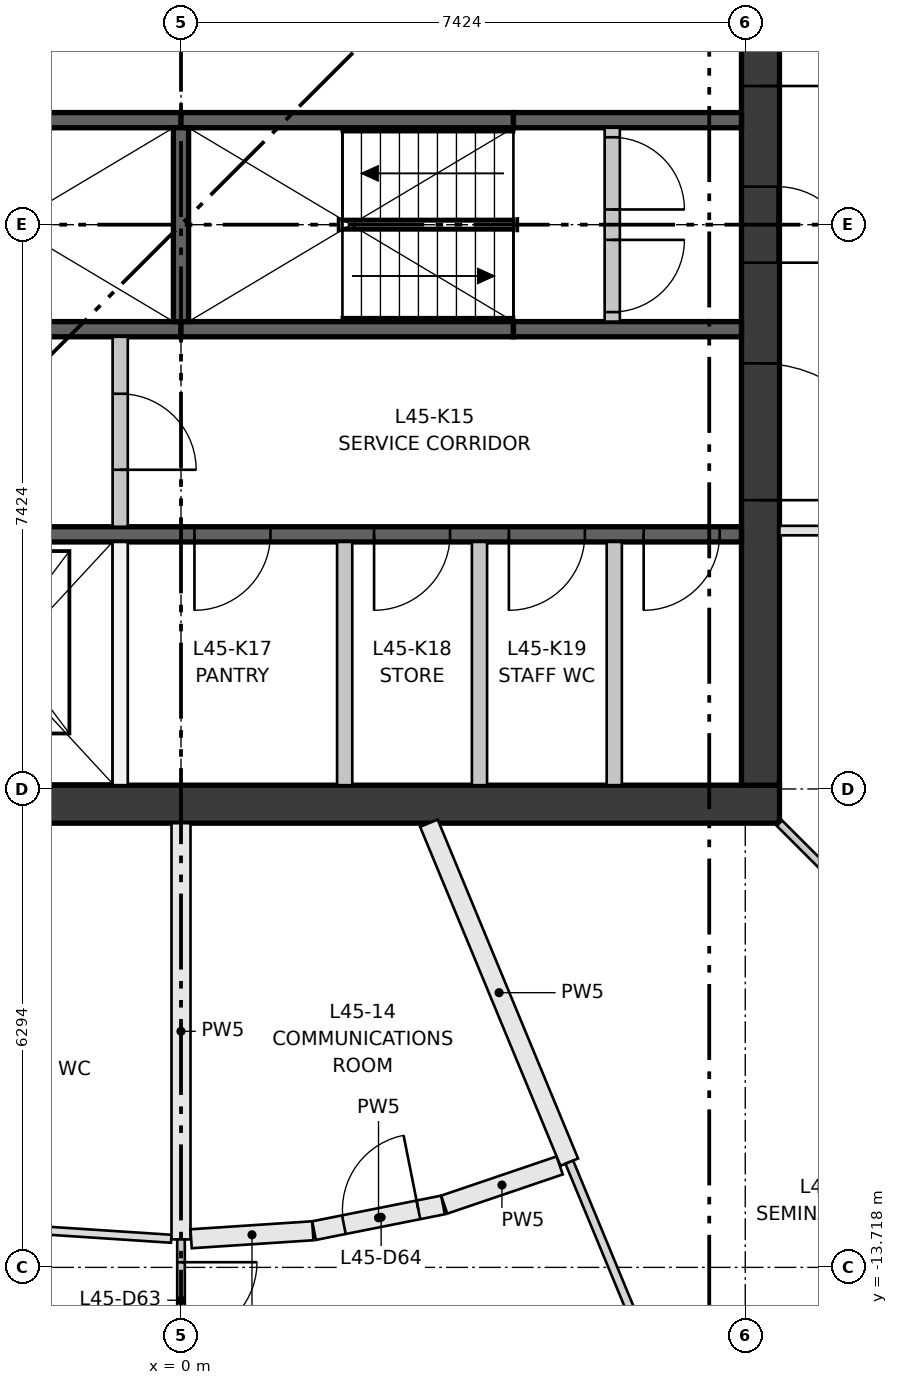
"""IFC4 building model, lengths in metres.
Left out: names, types, materials, properties, quantities, classifications, styles, units other than length and angle.
Written with IfcOpenShell. Run it as: python <this file> out.ifc"""

import sys

from ifc_helpers import new_model, si_unit, direction, frame, frame_2d, origin, place, context, subcontext, project, spatial, rectangle, extrude, element, fill, save


model = new_model("IFC4")
c1 = context("Model", 3, precision=1e-05, world=origin(), true_north=direction((0.0, 1.0)))
c2 = subcontext(c1, "Body", "Model", "MODEL_VIEW")
j1 = project(units=[si_unit("LENGTHUNIT", "METRE"), si_unit("PLANEANGLEUNIT", "RADIAN")], contexts=[c1])
p1 = place(None, origin())
s1 = spatial("IfcSite", under=j1, at=p1, CompositionType="ELEMENT")
p2 = place(p1, origin())
s2 = spatial("IfcBuilding", under=s1, at=p2, CompositionType="ELEMENT")
p3 = place(p2, frame((0.0, 0.0, 170.9)))
s3 = spatial("IfcBuildingStorey", under=s2, at=p3, CompositionType="ELEMENT", Elevation=170.9)
p4 = place(p3, frame((-7.874, -7.624, 0.0), z_axis=(0.0, 0.0, 1.0), x_axis=(1.0, 0.0, 0.0)))
e1 = element("IfcWall", 1, at=p4, inside=s3, PredefinedType="SHEAR", context=c2, shape_type="SweptSolid", body=[
    extrude(rectangle(XDim=15.748, YDim=0.5, at=frame_2d((7.874, 0.0))), origin(), (0.0, 0.0, 1.0), 3.35),
])
p5 = place(p3, frame((7.624, -7.374, 0.0), z_axis=(0.0, 0.0, 1.0), x_axis=(0.0, 1.0, 0.0)))
e2 = element("IfcWall", 2, at=p5, inside=s3, PredefinedType="SHEAR", context=c2, shape_type="SweptSolid", body=[
    extrude(rectangle(XDim=14.748, YDim=0.5, at=frame_2d((7.374, 0.0))), origin(), (0.0, 0.0, 1.0), 3.35),
])
p6 = place(p5, frame((6.874, 0.0, 0.0)))
e3 = element("IfcOpeningElement", 3, at=p6, cuts=e2, PredefinedType="OPENING", context=c2, shape_type="SweptSolid", body=[
    extrude(rectangle(XDim=1.0, YDim=2.1, at=frame_2d((0.5, 1.05))), frame((0.0, 0.26, 0.0), z_axis=(0.0, -1.0, 0.0), x_axis=(1.0, 0.0, 0.0)), (0.0, 0.0, 1.0), 0.52),
])
p7 = place(p5, frame((3.75, 0.0, 0.0)))
e4 = element("IfcOpeningElement", 4, at=p7, cuts=e2, PredefinedType="OPENING", context=c2, shape_type="SweptSolid", body=[
    extrude(rectangle(XDim=1.8, YDim=2.1, at=frame_2d((0.9, 1.05))), frame((0.0, 0.26, 0.0), z_axis=(0.0, -1.0, 0.0), x_axis=(1.0, 0.0, 0.0)), (0.0, 0.0, 1.0), 0.52),
])
p8 = place(p5, frame((9.198, 0.0, 0.0)))
e5 = element("IfcOpeningElement", 5, at=p8, cuts=e2, PredefinedType="OPENING", context=c2, shape_type="SweptSolid", body=[
    extrude(rectangle(XDim=1.8, YDim=2.1, at=frame_2d((0.9, 1.05))), frame((0.0, 0.26, 0.0), z_axis=(0.0, -1.0, 0.0), x_axis=(1.0, 0.0, 0.0)), (0.0, 0.0, 1.0), 0.52),
])
p9 = place(p3, frame((-7.374, -4.074, 0.0), z_axis=(0.0, 0.0, 1.0), x_axis=(1.0, 0.0, 0.0)))
e6 = element("IfcWall", 6, at=p9, inside=s3, PredefinedType="SHEAR", context=c2, shape_type="SweptSolid", body=[
    extrude(rectangle(XDim=14.748, YDim=0.2, at=frame_2d((7.374, 0.0))), origin(), (0.0, 0.0, 1.0), 3.0),
])
p10 = place(p9, frame((1.319, 0.0, 0.0)))
e7 = element("IfcOpeningElement", 7, at=p10, cuts=e6, PredefinedType="OPENING", context=c2, shape_type="SweptSolid", body=[
    extrude(rectangle(XDim=1.1, YDim=2.1, at=frame_2d((0.55, 1.05))), frame((0.0, 0.11, 0.0), z_axis=(0.0, -1.0, 0.0), x_axis=(1.0, 0.0, 0.0)), (0.0, 0.0, 1.0), 0.22),
])
p11 = place(p9, frame((4.456, 0.0, 0.0)))
e8 = element("IfcOpeningElement", 8, at=p11, cuts=e6, PredefinedType="OPENING", context=c2, shape_type="SweptSolid", body=[
    extrude(rectangle(XDim=1.1, YDim=2.1, at=frame_2d((0.55, 1.05))), frame((0.0, 0.11, 0.0), z_axis=(0.0, -1.0, 0.0), x_axis=(1.0, 0.0, 0.0)), (0.0, 0.0, 1.0), 0.22),
])
p12 = place(p9, frame((7.551, 0.0, 0.0)))
e9 = element("IfcOpeningElement", 9, at=p12, cuts=e6, PredefinedType="OPENING", context=c2, shape_type="SweptSolid", body=[
    extrude(rectangle(XDim=1.0, YDim=2.1, at=frame_2d((0.5, 1.05))), frame((0.0, 0.11, 0.0), z_axis=(0.0, -1.0, 0.0), x_axis=(1.0, 0.0, 0.0)), (0.0, 0.0, 1.0), 0.22),
])
p13 = place(p9, frame((9.914, 0.0, 0.0)))
e10 = element("IfcOpeningElement", 10, at=p13, cuts=e6, PredefinedType="OPENING", context=c2, shape_type="SweptSolid", body=[
    extrude(rectangle(XDim=1.0, YDim=2.1, at=frame_2d((0.5, 1.05))), frame((0.0, 0.11, 0.0), z_axis=(0.0, -1.0, 0.0), x_axis=(1.0, 0.0, 0.0)), (0.0, 0.0, 1.0), 0.22),
])
p14 = place(p9, frame((11.688, 0.0, 0.0)))
e11 = element("IfcOpeningElement", 11, at=p14, cuts=e6, PredefinedType="OPENING", context=c2, shape_type="SweptSolid", body=[
    extrude(rectangle(XDim=1.0, YDim=2.1, at=frame_2d((0.5, 1.05))), frame((0.0, 0.11, 0.0), z_axis=(0.0, -1.0, 0.0), x_axis=(1.0, 0.0, 0.0)), (0.0, 0.0, 1.0), 0.22),
])
p15 = place(p9, frame((13.461, 0.0, 0.0)))
e12 = element("IfcOpeningElement", 12, at=p15, cuts=e6, PredefinedType="OPENING", context=c2, shape_type="SweptSolid", body=[
    extrude(rectangle(XDim=1.0, YDim=2.1, at=frame_2d((0.5, 1.05))), frame((0.0, 0.11, 0.0), z_axis=(0.0, -1.0, 0.0), x_axis=(1.0, 0.0, 0.0)), (0.0, 0.0, 1.0), 0.22),
])
for number, where, z_axis, x_axis in (
    (13, (-4.374, -1.375, 0.0), (0.0, 0.0, 1.0), (1.0, 0.0, 0.0)),
    (14, (0.0, -1.375, 0.0), (0.0, 0.0, 1.0), (1.0, 0.0, 0.0)),
):
    element("IfcWall", number, at=place(p3, frame(where, z_axis=z_axis, x_axis=x_axis)), inside=s3, PredefinedType="SHEAR", context=c2, shape_type="SweptSolid", body=[
        extrude(rectangle(XDim=4.374, YDim=0.2, at=frame_2d((2.187, 0.0))), origin(), (0.0, 0.0, 1.0), 3.0),
    ])
p16 = place(p3, frame((4.374, -1.375, 0.0), z_axis=(0.0, 0.0, 1.0), x_axis=(1.0, 0.0, 0.0)))
e15 = element("IfcWall", 15, at=p16, inside=s3, PredefinedType="SHEAR", context=c2, shape_type="SweptSolid", body=[
    extrude(rectangle(XDim=3.0, YDim=0.2, at=frame_2d((1.5, 0.0))), origin(), (0.0, 0.0, 1.0), 3.0),
])
for number, where, z_axis, x_axis in (
    (16, (-4.374, 1.375, 0.0), (0.0, 0.0, 1.0), (1.0, 0.0, 0.0)),
    (17, (0.0, 1.375, 0.0), (0.0, 0.0, 1.0), (1.0, 0.0, 0.0)),
):
    element("IfcWall", number, at=place(p3, frame(where, z_axis=z_axis, x_axis=x_axis)), inside=s3, PredefinedType="SHEAR", context=c2, shape_type="SweptSolid", body=[
        extrude(rectangle(XDim=4.374, YDim=0.2, at=frame_2d((2.187, 0.0))), origin(), (0.0, 0.0, 1.0), 3.0),
    ])
p17 = place(p3, frame((4.374, 1.375, 0.0), z_axis=(0.0, 0.0, 1.0), x_axis=(1.0, 0.0, 0.0)))
e18 = element("IfcWall", 18, at=p17, inside=s3, PredefinedType="SHEAR", context=c2, shape_type="SweptSolid", body=[
    extrude(rectangle(XDim=3.0, YDim=0.2, at=frame_2d((1.5, 0.0))), origin(), (0.0, 0.0, 1.0), 3.0),
])
p18 = place(p3, frame((0.0, -1.275, 0.0), z_axis=(0.0, 0.0, 1.0), x_axis=(0.0, 1.0, 0.0)))
e19 = element("IfcWall", 19, at=p18, inside=s3, PredefinedType="SHEAR", context=c2, shape_type="SweptSolid", body=[
    extrude(rectangle(XDim=2.55, YDim=0.2, at=frame_2d((1.275, 0.0))), origin(), (0.0, 0.0, 1.0), 3.0),
])
p19 = place(p3, frame((-0.8, -7.374, 0.0), z_axis=(0.0, 0.0, 1.0), x_axis=(0.0, 1.0, 0.0)))
e20 = element("IfcWall", 20, at=p19, inside=s3, PredefinedType="PARTITIONING", context=c2, shape_type="SweptSolid", body=[
    extrude(rectangle(XDim=3.2, YDim=0.2, at=frame_2d((1.6, 0.0))), origin(), (0.0, 0.0, 1.0), 3.0),
])
p20 = place(p3, frame((-0.8, -3.974, 0.0), z_axis=(0.0, 0.0, 1.0), x_axis=(0.0, 1.0, 0.0)))
e21 = element("IfcWall", 21, at=p20, inside=s3, PredefinedType="PARTITIONING", context=c2, shape_type="SweptSolid", body=[
    extrude(rectangle(XDim=2.499, YDim=0.2, at=frame_2d((1.25, 0.0))), origin(), (0.0, 0.0, 1.0), 3.0),
])
p21 = place(p20, frame((0.75, 0.0, 0.0)))
e22 = element("IfcOpeningElement", 22, at=p21, cuts=e21, PredefinedType="OPENING", context=c2, shape_type="SweptSolid", body=[
    extrude(rectangle(XDim=1.0, YDim=2.1, at=frame_2d((0.5, 1.05))), frame((0.0, 0.11, 0.0), z_axis=(0.0, -1.0, 0.0), x_axis=(1.0, 0.0, 0.0)), (0.0, 0.0, 1.0), 0.22),
])
for number, where, z_axis, x_axis in (
    (23, (2.154, -7.374, 0.0), (0.0, 0.0, 1.0), (0.0, 1.0, 0.0)),
    (24, (3.927, -7.374, 0.0), (0.0, 0.0, 1.0), (0.0, 1.0, 0.0)),
    (25, (5.7, -7.374, 0.0), (0.0, 0.0, 1.0), (0.0, 1.0, 0.0)),
):
    element("IfcWall", number, at=place(p3, frame(where, z_axis=z_axis, x_axis=x_axis)), inside=s3, PredefinedType="PARTITIONING", context=c2, shape_type="SweptSolid", body=[
        extrude(rectangle(XDim=3.2, YDim=0.2, at=frame_2d((1.6, 0.0))), origin(), (0.0, 0.0, 1.0), 3.0),
    ])
p22 = place(p3, frame((5.674, -1.275, 0.0), z_axis=(0.0, 0.0, 1.0), x_axis=(0.0, 1.0, 0.0)))
e26 = element("IfcWall", 26, at=p22, inside=s3, PredefinedType="PARTITIONING", context=c2, shape_type="SweptSolid", body=[
    extrude(rectangle(XDim=2.55, YDim=0.2, at=frame_2d((1.275, 0.0))), origin(), (0.0, 0.0, 1.0), 3.0),
])
p23 = place(p22, frame((0.125, 0.0, 0.0)))
e27 = element("IfcOpeningElement", 27, at=p23, cuts=e26, PredefinedType="OPENING", context=c2, shape_type="SweptSolid", body=[
    extrude(rectangle(XDim=0.95, YDim=2.1, at=frame_2d((0.475, 1.05))), frame((0.0, 0.11, 0.0), z_axis=(0.0, -1.0, 0.0), x_axis=(1.0, 0.0, 0.0)), (0.0, 0.0, 1.0), 0.22),
])
p24 = place(p22, frame((1.475, 0.0, 0.0)))
e28 = element("IfcOpeningElement", 28, at=p24, cuts=e26, PredefinedType="OPENING", context=c2, shape_type="SweptSolid", body=[
    extrude(rectangle(XDim=0.95, YDim=2.1, at=frame_2d((0.475, 1.05))), frame((0.0, 0.11, 0.0), z_axis=(0.0, -1.0, 0.0), x_axis=(1.0, 0.0, 0.0)), (0.0, 0.0, 1.0), 0.22),
])
p25 = place(p3, frame((12.615, -4.024, 0.0), z_axis=(0.0, 0.0, 1.0), x_axis=(-1.0, 0.0, 0.0)))
e29 = element("IfcWall", 29, at=p25, inside=s3, PredefinedType="PARTITIONING", context=c2, shape_type="SweptSolid", body=[
    extrude(rectangle(XDim=4.741, YDim=0.125, at=frame_2d((2.37, 0.0))), origin(), (0.0, 0.0, 1.0), 3.0),
])
p26 = place(p25, frame((1.9, 0.0, 0.0)))
e30 = element("IfcOpeningElement", 30, at=p26, cuts=e29, PredefinedType="OPENING", context=c2, shape_type="SweptSolid", body=[
    extrude(rectangle(XDim=1.0, YDim=2.1, at=frame_2d((0.5, 1.05))), frame((0.0, 0.073, 0.0), z_axis=(0.0, -1.0, 0.0), x_axis=(1.0, 0.0, 0.0)), (0.0, 0.0, 1.0), 0.145),
])
p27 = place(p3, frame((-0.128, -13.342, 0.0), z_axis=(0.0, 0.0, 1.0), x_axis=(-0.997862773684, 0.065344356258, 0.0)))
e31 = element("IfcWall", 31, at=p27, inside=s3, PredefinedType="PARTITIONING", context=c2, shape_type="SweptSolid", body=[
    extrude(rectangle(XDim=1.614, YDim=0.105, at=frame_2d((0.807, 0.0))), origin(), (0.0, 0.0, 1.0), 3.0),
])
p28 = place(p3, frame((0.0, -7.874, 0.0), z_axis=(0.0, 0.0, 1.0), x_axis=(0.0, -1.0, 0.0)))
e32 = element("IfcWall", 32, at=p28, inside=s3, PredefinedType="PARTITIONING", context=c2, shape_type="SweptSolid", body=[
    extrude(rectangle(XDim=5.476, YDim=0.25, at=frame_2d((2.738, 0.0))), origin(), (0.0, 0.0, 1.0), 3.0),
])
p29 = place(p3, frame((0.0, -13.35, 0.0), z_axis=(0.0, 0.0, 1.0), x_axis=(0.0, -1.0, 0.0)))
e33 = element("IfcWall", 33, at=p29, inside=s3, PredefinedType="PARTITIONING", context=c2, shape_type="SweptSolid", body=[
    extrude(rectangle(XDim=4.27, YDim=0.1, at=frame_2d((2.135, 0.0))), origin(), (0.0, 0.0, 1.0), 3.0),
])
p30 = place(p29, frame((0.3, 0.0, 0.0)))
e34 = element("IfcOpeningElement", 34, at=p30, cuts=e33, PredefinedType="OPENING", context=c2, shape_type="SweptSolid", body=[
    extrude(rectangle(XDim=1.0, YDim=2.1, at=frame_2d((0.5, 1.05))), frame((0.0, 0.06, 0.0), z_axis=(0.0, -1.0, 0.0), x_axis=(1.0, 0.0, 0.0)), (0.0, 0.0, 1.0), 0.12),
])
p31 = place(p3, frame((1.734, -13.236, 0.0), z_axis=(0.0, 0.0, 1.0), x_axis=(-0.997857274773, -0.065428275107, 0.0)))
e35 = element("IfcWall", 35, at=p31, inside=s3, PredefinedType="PARTITIONING", context=c2, shape_type="SweptSolid", body=[
    extrude(rectangle(XDim=1.604, YDim=0.25, at=frame_2d((0.802, 0.0))), origin(), (0.0, 0.0, 1.0), 3.0),
])
p32 = place(p3, frame((1.75, -13.234, 0.0), z_axis=(0.0, 0.0, 1.0), x_axis=(0.98079718542, 0.195030461907, 0.0)))
e36 = element("IfcWall", 36, at=p32, inside=s3, PredefinedType="PARTITIONING", context=c2, shape_type="SweptSolid", body=[
    extrude(rectangle(XDim=1.73, YDim=0.25, at=frame_2d((0.865, 0.0))), origin(), (0.0, 0.0, 1.0), 3.0),
])
p33 = place(p32, frame((0.4, 0.0, 0.0)))
e37 = element("IfcOpeningElement", 37, at=p33, cuts=e36, PredefinedType="OPENING", context=c2, shape_type="SweptSolid", body=[
    extrude(rectangle(XDim=1.0, YDim=2.1, at=frame_2d((0.5, 1.05))), frame((0.0, 0.135, 0.0), z_axis=(0.0, -1.0, 0.0), x_axis=(1.0, 0.0, 0.0)), (0.0, 0.0, 1.0), 0.27),
])
p34 = place(p3, frame((4.982, -12.377, 0.0), z_axis=(0.0, 0.0, 1.0), x_axis=(-0.946919168061, -0.321471754838, 0.0)))
e38 = element("IfcWall", 38, at=p34, inside=s3, PredefinedType="PARTITIONING", context=c2, shape_type="SweptSolid", body=[
    extrude(rectangle(XDim=1.605, YDim=0.25, at=frame_2d((0.802, 0.0))), origin(), (0.0, 0.0, 1.0), 3.0),
])
p35 = place(p3, frame((3.261, -7.874, 0.0), z_axis=(0.0, 0.0, 1.0), x_axis=(0.382707643949, -0.923869503373, 0.0)))
e39 = element("IfcWall", 39, at=p35, inside=s3, PredefinedType="PARTITIONING", context=c2, shape_type="SweptSolid", body=[
    extrude(rectangle(XDim=4.827, YDim=0.25, at=frame_2d((2.414, 0.0))), origin(), (0.0, 0.0, 1.0), 3.0),
])
p36 = place(p3, frame((5.109, -12.334, 0.0), z_axis=(0.0, 0.0, 1.0), x_axis=(0.382669916503, -0.923885130849, 0.0)))
e40 = element("IfcWall", 40, at=p36, inside=s3, PredefinedType="PARTITIONING", context=c2, shape_type="SweptSolid", body=[
    extrude(rectangle(XDim=4.27, YDim=0.11, at=frame_2d((2.135, 0.0))), origin(), (0.0, 0.0, 1.0), 3.0),
])
p37 = place(p3, frame((12.459, -12.459, 0.0), z_axis=(0.0, 0.0, 1.0), x_axis=(-0.707106781187, 0.707106781187, 0.0)))
e41 = element("IfcWall", 41, at=p37, inside=s3, PredefinedType="PARTITIONING", context=c2, shape_type="SweptSolid", body=[
    extrude(rectangle(XDim=6.484, YDim=0.1, at=frame_2d((3.242, 0.0))), origin(), (0.0, 0.0, 1.0), 3.0),
])
p38 = place(p37, frame((3.0, 0.0, 0.0)))
e42 = element("IfcOpeningElement", 42, at=p38, cuts=e41, PredefinedType="OPENING", context=c2, shape_type="SweptSolid", body=[
    extrude(rectangle(XDim=1.0, YDim=2.1, at=frame_2d((0.5, 1.05))), frame((0.0, 0.06, 0.0), z_axis=(0.0, -1.0, 0.0), x_axis=(1.0, 0.0, 0.0)), (0.0, 0.0, 1.0), 0.12),
])
p39 = place(p23, frame((0.95, 0.0, 0.0), z_axis=(0.0, 0.0, 1.0), x_axis=(-1.0, 0.0, 0.0)))
e43 = element("IfcDoor", 43, at=p39, inside=s3, OperationType="SINGLE_SWING_RIGHT", PredefinedType="DOOR", context=c2, shape_type="SweptSolid", body=[
    extrude(rectangle(XDim=0.95, YDim=2.1, at=frame_2d((0.475, 1.05))), frame((0.0, 0.025, 0.0), z_axis=(0.0, -1.0, 0.0), x_axis=(1.0, 0.0, 0.0)), (0.0, 0.0, 1.0), 0.05),
])
fill(e27, e43)
p40 = place(p24, frame((0.95, 0.0, 0.0), z_axis=(0.0, 0.0, 1.0), x_axis=(-1.0, 0.0, 0.0)))
e44 = element("IfcDoor", 44, at=p40, inside=s3, OperationType="SINGLE_SWING_LEFT", PredefinedType="DOOR", context=c2, shape_type="SweptSolid", body=[
    extrude(rectangle(XDim=0.95, YDim=2.1, at=frame_2d((0.475, 1.05))), frame((0.0, 0.025, 0.0), z_axis=(0.0, -1.0, 0.0), x_axis=(1.0, 0.0, 0.0)), (0.0, 0.0, 1.0), 0.05),
])
fill(e28, e44)
p41 = place(p21, frame((1.0, 0.0, 0.0), z_axis=(0.0, 0.0, 1.0), x_axis=(-1.0, 0.0, 0.0)))
e45 = element("IfcDoor", 45, at=p41, inside=s3, OperationType="SINGLE_SWING_LEFT", PredefinedType="DOOR", context=c2, shape_type="SweptSolid", body=[
    extrude(rectangle(XDim=1.0, YDim=2.1, at=frame_2d((0.5, 1.05))), frame((0.0, 0.025, 0.0), z_axis=(0.0, -1.0, 0.0), x_axis=(1.0, 0.0, 0.0)), (0.0, 0.0, 1.0), 0.05),
])
fill(e22, e45)
p42 = place(p12, frame((1.0, 0.0, 0.0), z_axis=(0.0, 0.0, 1.0), x_axis=(-1.0, 0.0, 0.0)))
e46 = element("IfcDoor", 46, at=p42, inside=s3, OperationType="SINGLE_SWING_LEFT", PredefinedType="DOOR", context=c2, shape_type="SweptSolid", body=[
    extrude(rectangle(XDim=1.0, YDim=2.1, at=frame_2d((0.5, 1.05))), frame((0.0, 0.025, 0.0), z_axis=(0.0, -1.0, 0.0), x_axis=(1.0, 0.0, 0.0)), (0.0, 0.0, 1.0), 0.05),
])
fill(e9, e46)
p43 = place(p13, frame((1.0, 0.0, 0.0), z_axis=(0.0, 0.0, 1.0), x_axis=(-1.0, 0.0, 0.0)))
e47 = element("IfcDoor", 47, at=p43, inside=s3, OperationType="SINGLE_SWING_LEFT", PredefinedType="DOOR", context=c2, shape_type="SweptSolid", body=[
    extrude(rectangle(XDim=1.0, YDim=2.1, at=frame_2d((0.5, 1.05))), frame((0.0, 0.025, 0.0), z_axis=(0.0, -1.0, 0.0), x_axis=(1.0, 0.0, 0.0)), (0.0, 0.0, 1.0), 0.05),
])
fill(e10, e47)
p44 = place(p14, frame((1.0, 0.0, 0.0), z_axis=(0.0, 0.0, 1.0), x_axis=(-1.0, 0.0, 0.0)))
e48 = element("IfcDoor", 48, at=p44, inside=s3, OperationType="SINGLE_SWING_LEFT", PredefinedType="DOOR", context=c2, shape_type="SweptSolid", body=[
    extrude(rectangle(XDim=1.0, YDim=2.1, at=frame_2d((0.5, 1.05))), frame((0.0, 0.025, 0.0), z_axis=(0.0, -1.0, 0.0), x_axis=(1.0, 0.0, 0.0)), (0.0, 0.0, 1.0), 0.05),
])
fill(e11, e48)
p45 = place(p15, frame((1.0, 0.0, 0.0), z_axis=(0.0, 0.0, 1.0), x_axis=(-1.0, 0.0, 0.0)))
e49 = element("IfcDoor", 49, at=p45, inside=s3, OperationType="SINGLE_SWING_LEFT", PredefinedType="DOOR", context=c2, shape_type="SweptSolid", body=[
    extrude(rectangle(XDim=1.0, YDim=2.1, at=frame_2d((0.5, 1.05))), frame((0.0, 0.025, 0.0), z_axis=(0.0, -1.0, 0.0), x_axis=(1.0, 0.0, 0.0)), (0.0, 0.0, 1.0), 0.05),
])
fill(e12, e49)
p46 = place(p6, frame((1.0, 0.0, 0.0), z_axis=(0.0, 0.0, 1.0), x_axis=(-1.0, 0.0, 0.0)))
e50 = element("IfcDoor", 50, at=p46, inside=s3, OperationType="SINGLE_SWING_LEFT", PredefinedType="DOOR", context=c2, shape_type="SweptSolid", body=[
    extrude(rectangle(XDim=1.0, YDim=2.1, at=frame_2d((0.5, 1.05))), frame((0.0, 0.25, 0.0), z_axis=(0.0, -1.0, 0.0), x_axis=(1.0, 0.0, 0.0)), (0.0, 0.0, 1.0), 0.05),
])
fill(e3, e50)
p47 = place(p7, frame((1.8, 0.0, 0.0), z_axis=(0.0, 0.0, 1.0), x_axis=(-1.0, 0.0, 0.0)))
e51 = element("IfcDoor", 51, at=p47, inside=s3, OperationType="DOUBLE_DOOR_SINGLE_SWING", PredefinedType="DOOR", context=c2, shape_type="SweptSolid", body=[
    extrude(rectangle(XDim=1.8, YDim=2.1, at=frame_2d((0.9, 1.05))), frame((0.0, 0.025, 0.0), z_axis=(0.0, -1.0, 0.0), x_axis=(1.0, 0.0, 0.0)), (0.0, 0.0, 1.0), 0.05),
])
fill(e4, e51)
p48 = place(p8, frame((1.8, 0.0, 0.0), z_axis=(0.0, 0.0, 1.0), x_axis=(-1.0, 0.0, 0.0)))
e52 = element("IfcDoor", 52, at=p48, inside=s3, OperationType="DOUBLE_DOOR_SINGLE_SWING", PredefinedType="DOOR", context=c2, shape_type="SweptSolid", body=[
    extrude(rectangle(XDim=1.8, YDim=2.1, at=frame_2d((0.9, 1.05))), frame((0.0, 0.025, 0.0), z_axis=(0.0, -1.0, 0.0), x_axis=(1.0, 0.0, 0.0)), (0.0, 0.0, 1.0), 0.05),
])
fill(e5, e52)
p49 = place(p30, origin())
e53 = element("IfcDoor", 53, at=p49, inside=s3, OperationType="SINGLE_SWING_LEFT", PredefinedType="DOOR", context=c2, shape_type="SweptSolid", body=[
    extrude(rectangle(XDim=1.0, YDim=2.1, at=frame_2d((0.5, 1.05))), frame((0.0, 0.025, 0.0), z_axis=(0.0, -1.0, 0.0), x_axis=(1.0, 0.0, 0.0)), (0.0, 0.0, 1.0), 0.05),
])
fill(e34, e53)
p50 = place(p33, origin())
e54 = element("IfcDoor", 54, at=p50, inside=s3, OperationType="SINGLE_SWING_RIGHT", PredefinedType="DOOR", context=c2, shape_type="SweptSolid", body=[
    extrude(rectangle(XDim=1.0, YDim=2.1, at=frame_2d((0.5, 1.05))), frame((0.0, 0.025, 0.0), z_axis=(0.0, -1.0, 0.0), x_axis=(1.0, 0.0, 0.0)), (0.0, 0.0, 1.0), 0.05),
])
fill(e37, e54)
save(model, sys.argv[1])
